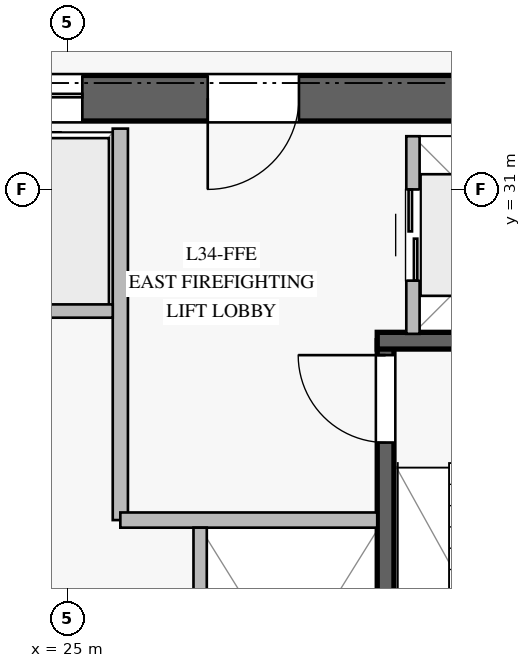
"""IFC4 building model, lengths in metres.
Left out: names, types, materials, properties, quantities, classifications, styles, units other than length and angle.
Written with IfcOpenShell. Run it as: python <this file> out.ifc"""

import sys

from ifc_helpers import new_model, si_unit, direction, frame, frame_2d, origin, place, context, subcontext, project, spatial, rectangle, extrude, element, fill, save


model = new_model("IFC4")
c1 = context("Model", 3, precision=1e-05, world=origin(), true_north=direction((0.0, 1.0)))
c2 = subcontext(c1, "Body", "Model", "MODEL_VIEW")
j1 = project(units=[si_unit("LENGTHUNIT", "METRE"), si_unit("PLANEANGLEUNIT", "RADIAN")], contexts=[c1])
p1 = place(None, origin())
s1 = spatial("IfcSite", under=j1, at=p1, CompositionType="ELEMENT")
p2 = place(p1, origin())
s2 = spatial("IfcBuilding", under=s1, at=p2, CompositionType="ELEMENT")
p3 = place(p2, frame((0.0, 0.0, 142.4)))
s3 = spatial("IfcBuildingStorey", under=s2, at=p3, CompositionType="ELEMENT", Elevation=142.4)
p4 = place(p3, frame((33.1, 32.2, 0.0), z_axis=(0.0, 0.0, 1.0), x_axis=(-1.0, 0.0, 0.0)))
e1 = element("IfcWall", 1, at=p4, inside=s3, PredefinedType="SHEAR", context=c2, shape_type="SweptSolid", body=[
    extrude(rectangle(XDim=16.2, YDim=0.6, at=frame_2d((8.1, 0.0))), origin(), (0.0, 0.0, 1.0), 3.76),
])
p5 = place(p4, frame((5.05, 0.0, 0.0)))
e2 = element("IfcOpeningElement", 2, at=p5, cuts=e1, PredefinedType="OPENING", context=c2, shape_type="SweptSolid", body=[
    extrude(rectangle(XDim=1.2, YDim=2.25, at=frame_2d((0.6, 1.125))), frame((0.0, 0.31, 0.0), z_axis=(0.0, -1.0, 0.0), x_axis=(1.0, 0.0, 0.0)), (0.0, 0.0, 1.0), 0.62),
])
p6 = place(p4, frame((11.85, 0.0, 0.0)))
e3 = element("IfcOpeningElement", 3, at=p6, cuts=e1, PredefinedType="OPENING", context=c2, shape_type="SweptSolid", body=[
    extrude(rectangle(XDim=1.1, YDim=2.2, at=frame_2d((0.55, 1.1))), frame((0.0, 0.31, 0.0), z_axis=(0.0, -1.0, 0.0), x_axis=(1.0, 0.0, 0.0)), (0.0, 0.0, 1.0), 0.62),
])
p7 = place(p4, frame((9.875, 0.0, 0.0)))
e4 = element("IfcOpeningElement", 4, at=p7, cuts=e1, PredefinedType="OPENING", context=c2, shape_type="SweptSolid", body=[
    extrude(rectangle(XDim=1.1, YDim=2.2, at=frame_2d((0.55, 1.1))), frame((0.0, 0.31, 0.0), z_axis=(0.0, -1.0, 0.0), x_axis=(1.0, 0.0, 0.0)), (0.0, 0.0, 1.0), 0.62),
])
p8 = place(p4, frame((7.9, 0.0, 0.0)))
e5 = element("IfcOpeningElement", 5, at=p8, cuts=e1, PredefinedType="OPENING", context=c2, shape_type="SweptSolid", body=[
    extrude(rectangle(XDim=1.1, YDim=2.2, at=frame_2d((0.55, 1.1))), frame((0.0, 0.31, 0.0), z_axis=(0.0, -1.0, 0.0), x_axis=(1.0, 0.0, 0.0)), (0.0, 0.0, 1.0), 0.62),
])
p9 = place(p3, frame((29.19, 21.79, 0.0), z_axis=(0.0, 0.0, 1.0), x_axis=(0.0, 1.0, 0.0)))
e6 = element("IfcWall", 6, at=p9, inside=s3, PredefinedType="SOLIDWALL", context=c2, shape_type="SweptSolid", body=[
    extrude(rectangle(XDim=7.22, YDim=0.22, at=frame_2d((3.61, 0.0))), origin(), (0.0, 0.0, 1.0), 3.76),
])
p10 = place(p9, frame((5.88, 0.0, 0.0)))
e7 = element("IfcOpeningElement", 7, at=p10, cuts=e6, PredefinedType="OPENING", context=c2, shape_type="SweptSolid", body=[
    extrude(rectangle(XDim=1.15, YDim=2.2, at=frame_2d((0.575, 1.1))), frame((0.0, 0.12, 0.0), z_axis=(0.0, -1.0, 0.0), x_axis=(1.0, 0.0, 0.0)), (0.0, 0.0, 1.0), 0.24),
])
p11 = place(p3, frame((29.08, 29.01, 0.0), z_axis=(0.0, 0.0, 1.0), x_axis=(1.0, 0.0, 0.0)))
e8 = element("IfcWall", 8, at=p11, inside=s3, PredefinedType="SOLIDWALL", context=c2, shape_type="SweptSolid", body=[
    extrude(rectangle(XDim=3.72, YDim=0.22, at=frame_2d((1.86, 0.0))), origin(), (0.0, 0.0, 1.0), 3.76),
])
p12 = place(p3, frame((25.7, 26.65, 0.0), z_axis=(0.0, 0.0, 1.0), x_axis=(0.0, 1.0, 0.0)))
e9 = element("IfcWall", 9, at=p12, inside=s3, PredefinedType="PARTITIONING", context=c2, shape_type="SweptSolid", body=[
    extrude(rectangle(XDim=5.15, YDim=0.2, at=frame_2d((2.575, 0.0))), origin(), (0.0, 0.0, 1.0), 3.76),
])
p13 = place(p3, frame((25.7, 26.65, 0.0), z_axis=(0.0, 0.0, 1.0), x_axis=(1.0, 0.0, 0.0)))
e10 = element("IfcWall", 10, at=p13, inside=s3, PredefinedType="PARTITIONING", context=c2, shape_type="SweptSolid", body=[
    extrude(rectangle(XDim=3.38, YDim=0.2, at=frame_2d((1.69, 0.0))), origin(), (0.0, 0.0, 1.0), 3.76),
])
for number, where, z_axis, x_axis in (
    (11, (23.7, 29.4, 0.0), (0.0, 0.0, 1.0), (1.0, 0.0, 0.0)),
    (12, (26.75, 24.65, 0.0), (0.0, 0.0, 1.0), (0.0, 1.0, 0.0)),
):
    element("IfcWall", number, at=place(p3, frame(where, z_axis=z_axis, x_axis=x_axis)), inside=s3, PredefinedType="PARTITIONING", context=c2, shape_type="SweptSolid", body=[
        extrude(rectangle(XDim=1.9, YDim=0.175, at=frame_2d((0.95, 0.0))), origin(), (0.0, 0.0, 1.0), 3.76),
    ])
p14 = place(p3, frame((29.55, 29.1, 0.0), z_axis=(0.0, 0.0, 1.0), x_axis=(0.0, 1.0, 0.0)))
e13 = element("IfcWall", 13, at=p14, inside=s3, PredefinedType="PARTITIONING", context=c2, shape_type="SweptSolid", body=[
    extrude(rectangle(XDim=2.6, YDim=0.175, at=frame_2d((1.3, 0.0))), origin(), (0.0, 0.0, 1.0), 3.76),
])
p15 = place(p14, frame((0.7, 0.0, 0.0)))
e14 = element("IfcOpeningElement", 14, at=p15, cuts=e13, PredefinedType="OPENING", context=c2, shape_type="SweptSolid", body=[
    extrude(rectangle(XDim=1.2, YDim=2.2, at=frame_2d((0.6, 1.1))), frame((0.0, 0.098, 0.0), z_axis=(0.0, -1.0, 0.0), x_axis=(1.0, 0.0, 0.0)), (0.0, 0.0, 1.0), 0.195),
])
p16 = place(p10, origin())
e15 = element("IfcDoor", 15, at=p16, inside=s3, OperationType="SINGLE_SWING_RIGHT", PredefinedType="DOOR", context=c2, shape_type="SweptSolid", body=[
    extrude(rectangle(XDim=1.15, YDim=2.2, at=frame_2d((0.575, 1.1))), frame((0.0, 0.025, 0.0), z_axis=(0.0, -1.0, 0.0), x_axis=(1.0, 0.0, 0.0)), (0.0, 0.0, 1.0), 0.05),
])
fill(e7, e15)
p17 = place(p5, origin())
e16 = element("IfcDoor", 16, at=p17, inside=s3, OperationType="SINGLE_SWING_RIGHT", PredefinedType="DOOR", context=c2, shape_type="SweptSolid", body=[
    extrude(rectangle(XDim=1.2, YDim=2.25, at=frame_2d((0.6, 1.125))), frame((0.0, 0.025, 0.0), z_axis=(0.0, -1.0, 0.0), x_axis=(1.0, 0.0, 0.0)), (0.0, 0.0, 1.0), 0.05),
])
fill(e2, e16)
p18 = place(p8, origin())
e17 = element("IfcDoor", 17, at=p18, inside=s3, OperationType="DOUBLE_DOOR_SLIDING", PredefinedType="DOOR", context=c2, shape_type="SweptSolid", body=[
    extrude(rectangle(XDim=1.1, YDim=2.2, at=frame_2d((0.55, 1.1))), frame((0.0, 0.025, 0.0), z_axis=(0.0, -1.0, 0.0), x_axis=(1.0, 0.0, 0.0)), (0.0, 0.0, 1.0), 0.05),
])
fill(e5, e17)
p19 = place(p15, origin())
e18 = element("IfcDoor", 18, at=p19, inside=s3, OperationType="DOUBLE_DOOR_SLIDING", PredefinedType="DOOR", context=c2, shape_type="SweptSolid", body=[
    extrude(rectangle(XDim=1.2, YDim=2.2, at=frame_2d((0.6, 1.1))), frame((0.0, 0.025, 0.0), z_axis=(0.0, -1.0, 0.0), x_axis=(1.0, 0.0, 0.0)), (0.0, 0.0, 1.0), 0.05),
])
fill(e14, e18)
save(model, sys.argv[1])
